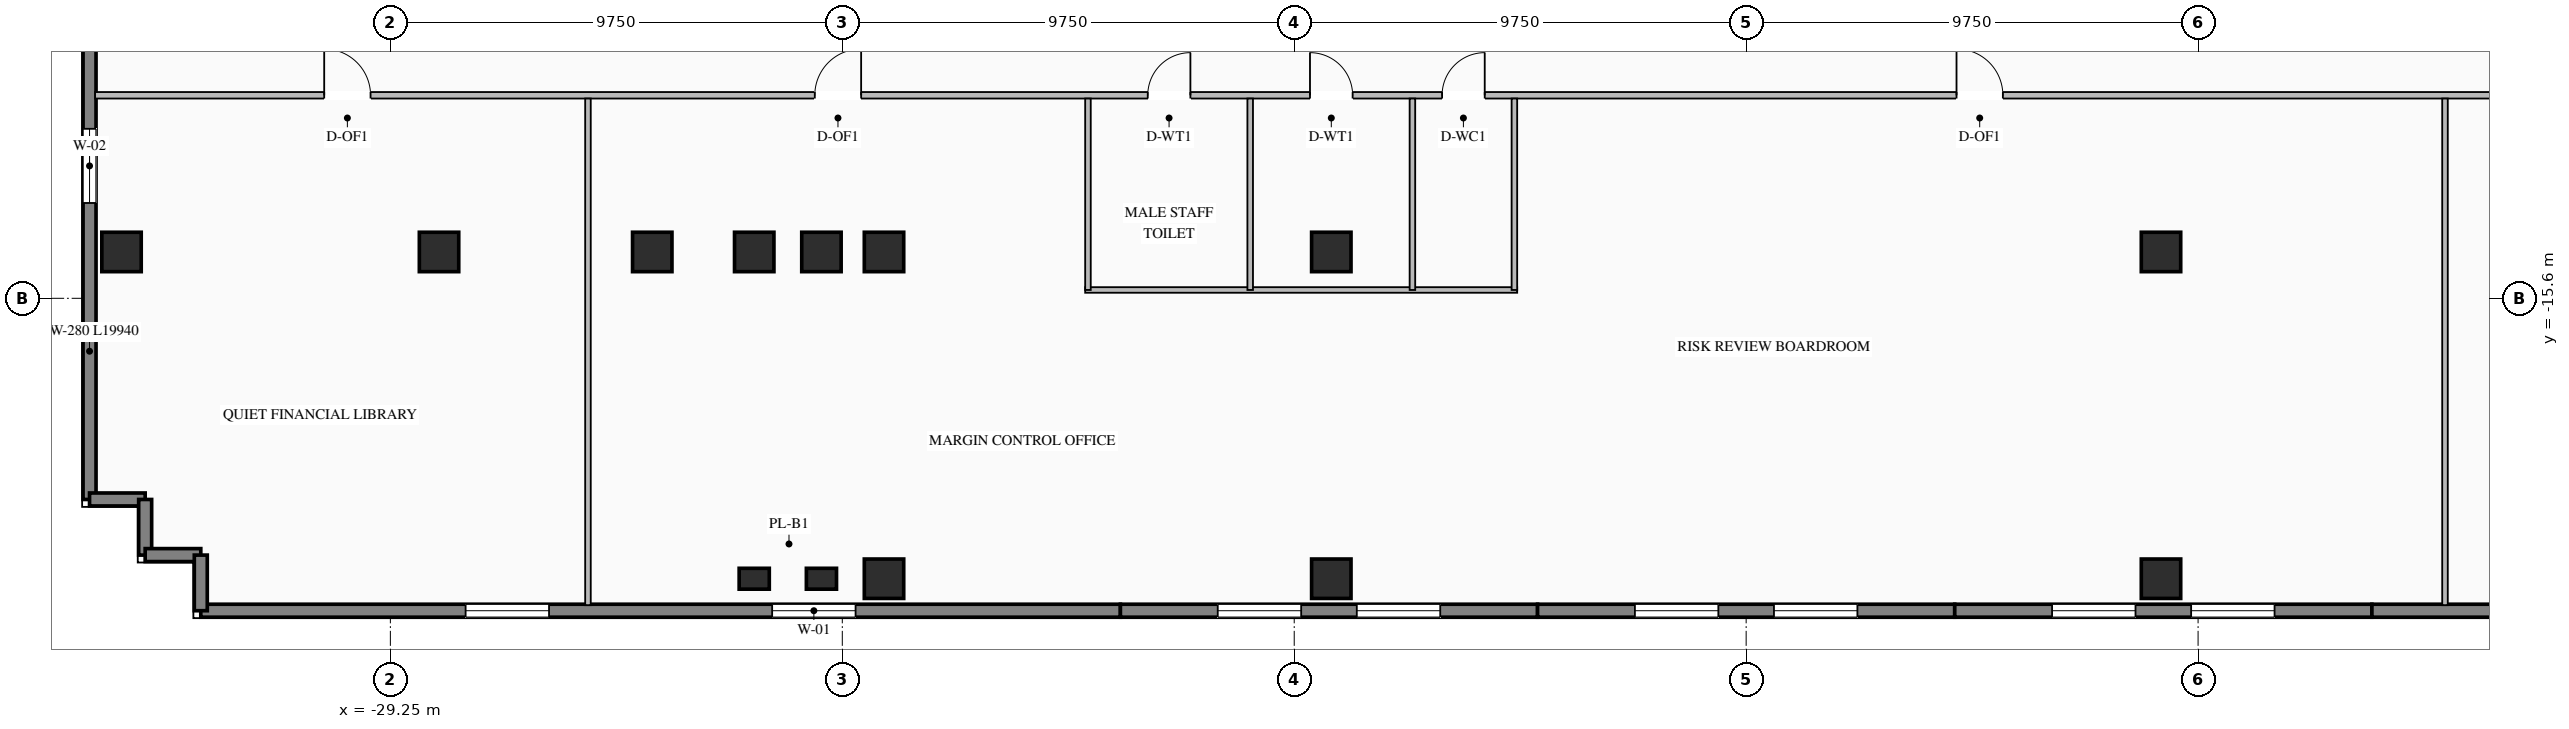
"""IFC4 building model, lengths in metres.
Left out: names, types, materials, properties, quantities, classifications, styles, units other than length and angle.
Written with IfcOpenShell. Run it as: python <this file> out.ifc"""

import sys

from ifc_helpers import new_model, si_unit, direction, frame, frame_2d, origin, origin_2d, place, context, subcontext, project, spatial, rectangle, i_section, extrude, element, fill, save


model = new_model("IFC4")
c1 = context("Model", 3, precision=1e-05, world=origin(), true_north=direction((0.0, 1.0)))
c2 = subcontext(c1, "Body", "Model", "MODEL_VIEW")
j1 = project(units=[si_unit("LENGTHUNIT", "METRE"), si_unit("PLANEANGLEUNIT", "RADIAN")], contexts=[c1])
p1 = place(None, origin())
s1 = spatial("IfcSite", under=j1, at=p1, CompositionType="ELEMENT")
p2 = place(p1, origin())
s2 = spatial("IfcBuilding", under=s1, at=p2, CompositionType="ELEMENT")
p3 = place(p2, frame((0.0, 0.0, 31.2)))
s3 = spatial("IfcBuildingStorey", under=s2, at=p3, CompositionType="ELEMENT", Elevation=31.2)
for number, where, z_axis, x_axis in (
    (1, (-21.4, -14.6, 0.0), (0.0, 0.0, 1.0), (1.0, 0.0, 0.0)),
    (2, (-19.95, -14.6, 0.0), (0.0, 0.0, 1.0), (1.0, 0.0, 0.0)),
    (3, (-18.6, -14.6, 0.0), (0.0, 0.0, 1.0), (1.0, 0.0, 0.0)),
    (4, (-8.95, -14.6, 0.0), (0.0, 0.0, 1.0), (1.0, 0.0, 0.0)),
    (5, (8.95, -14.6, 0.0), (0.0, 0.0, 1.0), (1.0, 0.0, 0.0)),
    (6, (-23.6, -14.6, 0.0), (0.0, 0.0, 1.0), (1.0, 0.0, 0.0)),
    (7, (-28.2, -14.6, 0.0), (0.0, 0.0, 1.0), (1.0, 0.0, 0.0)),
    (8, (-18.6, -21.65, 0.0), (0.0, 0.0, 1.0), (1.0, 0.0, 0.0)),
    (9, (-8.95, -21.65, 0.0), (0.0, 0.0, 1.0), (1.0, 0.0, 0.0)),
    (10, (8.95, -21.65, 0.0), (0.0, 0.0, 1.0), (1.0, 0.0, 0.0)),
    (11, (-35.05, -14.6, 0.0), (0.0, 0.0, 1.0), (1.0, 0.0, 0.0)),
):
    element("IfcColumn", number, at=place(p3, frame(where, z_axis=z_axis, x_axis=x_axis)), inside=s3, PredefinedType="COLUMN", context=c2, shape_type="SweptSolid", body=[
        extrude(i_section(OverallWidth=0.85, OverallDepth=0.85, WebThickness=0.032, FlangeThickness=0.048, at=origin_2d()), origin(), (0.0, 0.0, 1.0), 3.45),
    ])
for number, where, z_axis, x_axis in (
    (12, (-21.4, -21.65, 0.0), (0.0, 0.0, 1.0), (1.0, 0.0, 0.0)),
    (13, (-19.95, -21.65, 0.0), (0.0, 0.0, 1.0), (1.0, 0.0, 0.0)),
):
    element("IfcColumn", number, at=place(p3, frame(where, z_axis=z_axis, x_axis=x_axis)), inside=s3, PredefinedType="PILASTER", context=c2, shape_type="SweptSolid", body=[
        extrude(rectangle(XDim=0.65, YDim=0.45, at=origin_2d()), origin(), (0.0, 0.0, 1.0), 3.45),
    ])
p4 = place(p3, frame((-13.5, -22.34, 0.0), z_axis=(0.0, 0.0, 1.0), x_axis=(-1.0, 0.0, 0.0)))
e14 = element("IfcWall", 14, at=p4, inside=s3, PredefinedType="STANDARD", context=c2, shape_type="SweptSolid", body=[
    extrude(rectangle(XDim=19.84, YDim=0.28, at=frame_2d((9.92, 0.0))), origin(), (0.0, 0.0, 1.0), 3.25),
])
p5 = place(p4, frame((5.713, 0.0, 0.76)))
e15 = element("IfcOpeningElement", 15, at=p5, cuts=e14, PredefinedType="OPENING", context=c2, shape_type="SweptSolid", body=[
    extrude(rectangle(XDim=1.8, YDim=1.95, at=frame_2d((0.9, 0.975))), frame((0.0, 0.15, 0.0), z_axis=(0.0, -1.0, 0.0), x_axis=(1.0, 0.0, 0.0)), (0.0, 0.0, 1.0), 0.3),
])
p6 = place(p4, frame((12.327, 0.0, 0.76)))
e16 = element("IfcOpeningElement", 16, at=p6, cuts=e14, PredefinedType="OPENING", context=c2, shape_type="SweptSolid", body=[
    extrude(rectangle(XDim=1.8, YDim=1.95, at=frame_2d((0.9, 0.975))), frame((0.0, 0.15, 0.0), z_axis=(0.0, -1.0, 0.0), x_axis=(1.0, 0.0, 0.0)), (0.0, 0.0, 1.0), 0.3),
])
p7 = place(p3, frame((-4.5, -22.34, 0.0), z_axis=(0.0, 0.0, 1.0), x_axis=(-1.0, 0.0, 0.0)))
e17 = element("IfcWall", 17, at=p7, inside=s3, PredefinedType="STANDARD", context=c2, shape_type="SweptSolid", body=[
    extrude(rectangle(XDim=9.0, YDim=0.28, at=frame_2d((4.5, 0.0))), origin(), (0.0, 0.0, 1.0), 3.25),
])
p8 = place(p7, frame((2.1, 0.0, 0.76)))
e18 = element("IfcOpeningElement", 18, at=p8, cuts=e17, PredefinedType="OPENING", context=c2, shape_type="SweptSolid", body=[
    extrude(rectangle(XDim=1.8, YDim=1.95, at=frame_2d((0.9, 0.975))), frame((0.0, 0.15, 0.0), z_axis=(0.0, -1.0, 0.0), x_axis=(1.0, 0.0, 0.0)), (0.0, 0.0, 1.0), 0.3),
])
p9 = place(p7, frame((5.1, 0.0, 0.76)))
e19 = element("IfcOpeningElement", 19, at=p9, cuts=e17, PredefinedType="OPENING", context=c2, shape_type="SweptSolid", body=[
    extrude(rectangle(XDim=1.8, YDim=1.95, at=frame_2d((0.9, 0.975))), frame((0.0, 0.15, 0.0), z_axis=(0.0, -1.0, 0.0), x_axis=(1.0, 0.0, 0.0)), (0.0, 0.0, 1.0), 0.3),
])
p10 = place(p3, frame((4.5, -22.34, 0.0), z_axis=(0.0, 0.0, 1.0), x_axis=(-1.0, 0.0, 0.0)))
e20 = element("IfcWall", 20, at=p10, inside=s3, PredefinedType="STANDARD", context=c2, shape_type="SweptSolid", body=[
    extrude(rectangle(XDim=9.0, YDim=0.28, at=frame_2d((4.5, 0.0))), origin(), (0.0, 0.0, 1.0), 3.25),
])
p11 = place(p10, frame((2.1, 0.0, 0.76)))
e21 = element("IfcOpeningElement", 21, at=p11, cuts=e20, PredefinedType="OPENING", context=c2, shape_type="SweptSolid", body=[
    extrude(rectangle(XDim=1.8, YDim=1.95, at=frame_2d((0.9, 0.975))), frame((0.0, 0.15, 0.0), z_axis=(0.0, -1.0, 0.0), x_axis=(1.0, 0.0, 0.0)), (0.0, 0.0, 1.0), 0.3),
])
p12 = place(p10, frame((5.1, 0.0, 0.76)))
e22 = element("IfcOpeningElement", 22, at=p12, cuts=e20, PredefinedType="OPENING", context=c2, shape_type="SweptSolid", body=[
    extrude(rectangle(XDim=1.8, YDim=1.95, at=frame_2d((0.9, 0.975))), frame((0.0, 0.15, 0.0), z_axis=(0.0, -1.0, 0.0), x_axis=(1.0, 0.0, 0.0)), (0.0, 0.0, 1.0), 0.3),
])
p13 = place(p3, frame((13.5, -22.34, 0.0), z_axis=(0.0, 0.0, 1.0), x_axis=(-1.0, 0.0, 0.0)))
e23 = element("IfcWall", 23, at=p13, inside=s3, PredefinedType="STANDARD", context=c2, shape_type="SweptSolid", body=[
    extrude(rectangle(XDim=9.0, YDim=0.28, at=frame_2d((4.5, 0.0))), origin(), (0.0, 0.0, 1.0), 3.25),
])
p14 = place(p13, frame((2.1, 0.0, 0.76)))
e24 = element("IfcOpeningElement", 24, at=p14, cuts=e23, PredefinedType="OPENING", context=c2, shape_type="SweptSolid", body=[
    extrude(rectangle(XDim=1.8, YDim=1.95, at=frame_2d((0.9, 0.975))), frame((0.0, 0.15, 0.0), z_axis=(0.0, -1.0, 0.0), x_axis=(1.0, 0.0, 0.0)), (0.0, 0.0, 1.0), 0.3),
])
p15 = place(p13, frame((5.1, 0.0, 0.76)))
e25 = element("IfcOpeningElement", 25, at=p15, cuts=e23, PredefinedType="OPENING", context=c2, shape_type="SweptSolid", body=[
    extrude(rectangle(XDim=1.8, YDim=1.95, at=frame_2d((0.9, 0.975))), frame((0.0, 0.15, 0.0), z_axis=(0.0, -1.0, 0.0), x_axis=(1.0, 0.0, 0.0)), (0.0, 0.0, 1.0), 0.3),
])
p16 = place(p3, frame((33.34, -22.34, 0.0), z_axis=(0.0, 0.0, 1.0), x_axis=(-1.0, 0.0, 0.0)))
e26 = element("IfcWall", 26, at=p16, inside=s3, PredefinedType="STANDARD", context=c2, shape_type="SweptSolid", body=[
    extrude(rectangle(XDim=19.84, YDim=0.28, at=frame_2d((9.92, 0.0))), origin(), (0.0, 0.0, 1.0), 3.25),
])
p17 = place(p16, frame((5.713, 0.0, 0.76)))
e27 = element("IfcOpeningElement", 27, at=p17, cuts=e26, PredefinedType="OPENING", context=c2, shape_type="SweptSolid", body=[
    extrude(rectangle(XDim=1.8, YDim=1.95, at=frame_2d((0.9, 0.975))), frame((0.0, 0.15, 0.0), z_axis=(0.0, -1.0, 0.0), x_axis=(1.0, 0.0, 0.0)), (0.0, 0.0, 1.0), 0.3),
])
p18 = place(p16, frame((12.327, 0.0, 0.76)))
e28 = element("IfcOpeningElement", 28, at=p18, cuts=e26, PredefinedType="OPENING", context=c2, shape_type="SweptSolid", body=[
    extrude(rectangle(XDim=1.8, YDim=1.95, at=frame_2d((0.9, 0.975))), frame((0.0, 0.15, 0.0), z_axis=(0.0, -1.0, 0.0), x_axis=(1.0, 0.0, 0.0)), (0.0, 0.0, 1.0), 0.3),
])
p19 = place(p3, frame((-35.74, -19.94, 0.0), z_axis=(0.0, 0.0, 1.0), x_axis=(0.0, 1.0, 0.0)))
e29 = element("IfcWall", 29, at=p19, inside=s3, PredefinedType="STANDARD", context=c2, shape_type="SweptSolid", body=[
    extrude(rectangle(XDim=19.94, YDim=0.28, at=frame_2d((9.97, 0.0))), origin(), (0.0, 0.0, 1.0), 3.25),
])
p20 = place(p19, frame((6.397, 0.0, 0.76)))
e30 = element("IfcOpeningElement", 30, at=p20, cuts=e29, PredefinedType="OPENING", context=c2, shape_type="SweptSolid", body=[
    extrude(rectangle(XDim=1.6, YDim=1.95, at=frame_2d((0.8, 0.975))), frame((0.0, 0.15, 0.0), z_axis=(0.0, -1.0, 0.0), x_axis=(1.0, 0.0, 0.0)), (0.0, 0.0, 1.0), 0.3),
])
p21 = place(p19, frame((12.493, 0.0, 0.76)))
e31 = element("IfcOpeningElement", 31, at=p21, cuts=e29, PredefinedType="OPENING", context=c2, shape_type="SweptSolid", body=[
    extrude(rectangle(XDim=1.6, YDim=1.95, at=frame_2d((0.8, 0.975))), frame((0.0, 0.15, 0.0), z_axis=(0.0, -1.0, 0.0), x_axis=(1.0, 0.0, 0.0)), (0.0, 0.0, 1.0), 0.3),
])
for number, where, z_axis, x_axis in (
    (32, (-35.74, -19.94, 0.0), (0.0, 0.0, 1.0), (1.0, 0.0, 0.0)),
    (33, (-34.54, -19.94, 0.0), (0.0, 0.0, 1.0), (0.0, -1.0, 0.0)),
    (34, (-34.54, -21.14, 0.0), (0.0, 0.0, 1.0), (1.0, 0.0, 0.0)),
):
    element("IfcWall", number, at=place(p3, frame(where, z_axis=z_axis, x_axis=x_axis)), inside=s3, PredefinedType="STANDARD", context=c2, shape_type="SweptSolid", body=[
        extrude(rectangle(XDim=1.2, YDim=0.28, at=frame_2d((0.6, 0.0))), origin(), (0.0, 0.0, 1.0), 3.25),
    ])
p22 = place(p3, frame((-33.34, -21.14, 0.0), z_axis=(0.0, 0.0, 1.0), x_axis=(0.0, -1.0, 0.0)))
e35 = element("IfcWall", 35, at=p22, inside=s3, PredefinedType="STANDARD", context=c2, shape_type="SweptSolid", body=[
    extrude(rectangle(XDim=1.2, YDim=0.28, at=frame_2d((0.6, 0.0))), origin(), (0.0, 0.0, 1.0), 3.25),
])
p23 = place(p3, frame((-35.62, -11.22, 0.0), z_axis=(0.0, 0.0, 1.0), x_axis=(1.0, 0.0, 0.0)))
e36 = element("IfcWall", 36, at=p23, inside=s3, PredefinedType="STANDARD", context=c2, shape_type="SweptSolid", body=[
    extrude(rectangle(XDim=71.24, YDim=0.14, at=frame_2d((35.62, 0.0))), origin(), (0.0, 0.0, 1.0), 2.745),
])
p24 = place(p23, frame((22.71, 0.0, 0.0)))
e37 = element("IfcOpeningElement", 37, at=p24, cuts=e36, PredefinedType="OPENING", context=c2, shape_type="SweptSolid", body=[
    extrude(rectangle(XDim=0.92, YDim=2.08, at=frame_2d((0.46, 1.04))), frame((0.0, 0.08, 0.0), z_axis=(0.0, -1.0, 0.0), x_axis=(1.0, 0.0, 0.0)), (0.0, 0.0, 1.0), 0.16),
])
p25 = place(p23, frame((26.21, 0.0, 0.0)))
e38 = element("IfcOpeningElement", 38, at=p25, cuts=e36, PredefinedType="OPENING", context=c2, shape_type="SweptSolid", body=[
    extrude(rectangle(XDim=0.92, YDim=2.08, at=frame_2d((0.46, 1.04))), frame((0.0, 0.08, 0.0), z_axis=(0.0, -1.0, 0.0), x_axis=(1.0, 0.0, 0.0)), (0.0, 0.0, 1.0), 0.16),
])
p26 = place(p23, frame((29.06, 0.0, 0.0)))
e39 = element("IfcOpeningElement", 39, at=p26, cuts=e36, PredefinedType="OPENING", context=c2, shape_type="SweptSolid", body=[
    extrude(rectangle(XDim=0.92, YDim=2.08, at=frame_2d((0.46, 1.04))), frame((0.0, 0.08, 0.0), z_axis=(0.0, -1.0, 0.0), x_axis=(1.0, 0.0, 0.0)), (0.0, 0.0, 1.0), 0.16),
])
p27 = place(p23, frame((4.942, 0.0, 0.0)))
e40 = element("IfcOpeningElement", 40, at=p27, cuts=e36, PredefinedType="OPENING", context=c2, shape_type="SweptSolid", body=[
    extrude(rectangle(XDim=1.0, YDim=2.08, at=frame_2d((0.5, 1.04))), frame((0.0, 0.08, 0.0), z_axis=(0.0, -1.0, 0.0), x_axis=(1.0, 0.0, 0.0)), (0.0, 0.0, 1.0), 0.16),
])
p28 = place(p23, frame((15.527, 0.0, 0.0)))
e41 = element("IfcOpeningElement", 41, at=p28, cuts=e36, PredefinedType="OPENING", context=c2, shape_type="SweptSolid", body=[
    extrude(rectangle(XDim=1.0, YDim=2.08, at=frame_2d((0.5, 1.04))), frame((0.0, 0.08, 0.0), z_axis=(0.0, -1.0, 0.0), x_axis=(1.0, 0.0, 0.0)), (0.0, 0.0, 1.0), 0.16),
])
p29 = place(p23, frame((40.158, 0.0, 0.0)))
e42 = element("IfcOpeningElement", 42, at=p29, cuts=e36, PredefinedType="OPENING", context=c2, shape_type="SweptSolid", body=[
    extrude(rectangle(XDim=1.0, YDim=2.08, at=frame_2d((0.5, 1.04))), frame((0.0, 0.08, 0.0), z_axis=(0.0, -1.0, 0.0), x_axis=(1.0, 0.0, 0.0)), (0.0, 0.0, 1.0), 0.16),
])
p30 = place(p23, frame((60.343, 0.0, 0.0)))
e43 = element("IfcOpeningElement", 43, at=p30, cuts=e36, PredefinedType="OPENING", context=c2, shape_type="SweptSolid", body=[
    extrude(rectangle(XDim=1.0, YDim=2.08, at=frame_2d((0.5, 1.04))), frame((0.0, 0.08, 0.0), z_axis=(0.0, -1.0, 0.0), x_axis=(1.0, 0.0, 0.0)), (0.0, 0.0, 1.0), 0.16),
])
p31 = place(p3, frame((-14.26, -15.42, 0.0), z_axis=(0.0, 0.0, 1.0), x_axis=(1.0, 0.0, 0.0)))
e44 = element("IfcWall", 44, at=p31, inside=s3, PredefinedType="STANDARD", context=c2, shape_type="SweptSolid", body=[
    extrude(rectangle(XDim=9.32, YDim=0.12, at=frame_2d((4.66, 0.0))), origin(), (0.0, 0.0, 1.0), 3.25),
])
for number, where, z_axis, x_axis in (
    (45, (-14.2, -15.42, 0.0), (0.0, 0.0, 1.0), (0.0, 1.0, 0.0)),
    (46, (-10.7, -15.42, 0.0), (0.0, 0.0, 1.0), (0.0, 1.0, 0.0)),
    (47, (-7.2, -15.42, 0.0), (0.0, 0.0, 1.0), (0.0, 1.0, 0.0)),
    (48, (-5.0, -15.42, 0.0), (0.0, 0.0, 1.0), (0.0, 1.0, 0.0)),
):
    element("IfcWall", number, at=place(p3, frame(where, z_axis=z_axis, x_axis=x_axis)), inside=s3, PredefinedType="STANDARD", context=c2, shape_type="SweptSolid", body=[
        extrude(rectangle(XDim=4.13, YDim=0.12, at=frame_2d((2.065, 0.0))), origin(), (0.0, 0.0, 1.0), 3.25),
    ])
for number, where, z_axis, x_axis in (
    (49, (-24.987, -22.22, 0.0), (0.0, 0.0, 1.0), (0.0, 1.0, 0.0)),
    (50, (15.077, -22.22, 0.0), (0.0, 0.0, 1.0), (0.0, 1.0, 0.0)),
):
    element("IfcWall", number, at=place(p3, frame(where, z_axis=z_axis, x_axis=x_axis)), inside=s3, PredefinedType="STANDARD", context=c2, shape_type="SweptSolid", body=[
        extrude(rectangle(XDim=10.93, YDim=0.12, at=frame_2d((5.465, 0.0))), origin(), (0.0, 0.0, 1.0), 3.25),
    ])
p32 = place(p5, origin())
e51 = element("IfcWindow", 51, at=p32, inside=s3, PartitioningType="SINGLE_PANEL", PredefinedType="WINDOW", context=c2, shape_type="SweptSolid", body=[
    extrude(rectangle(XDim=1.8, YDim=1.95, at=frame_2d((0.9, 0.975))), frame((0.0, 0.03, 0.0), z_axis=(0.0, -1.0, 0.0), x_axis=(1.0, 0.0, 0.0)), (0.0, 0.0, 1.0), 0.06),
])
fill(e15, e51)
p33 = place(p6, origin())
e52 = element("IfcWindow", 52, at=p33, inside=s3, PartitioningType="SINGLE_PANEL", PredefinedType="WINDOW", context=c2, shape_type="SweptSolid", body=[
    extrude(rectangle(XDim=1.8, YDim=1.95, at=frame_2d((0.9, 0.975))), frame((0.0, 0.03, 0.0), z_axis=(0.0, -1.0, 0.0), x_axis=(1.0, 0.0, 0.0)), (0.0, 0.0, 1.0), 0.06),
])
fill(e16, e52)
p34 = place(p8, origin())
e53 = element("IfcWindow", 53, at=p34, inside=s3, PartitioningType="SINGLE_PANEL", PredefinedType="WINDOW", context=c2, shape_type="SweptSolid", body=[
    extrude(rectangle(XDim=1.8, YDim=1.95, at=frame_2d((0.9, 0.975))), frame((0.0, 0.03, 0.0), z_axis=(0.0, -1.0, 0.0), x_axis=(1.0, 0.0, 0.0)), (0.0, 0.0, 1.0), 0.06),
])
fill(e18, e53)
p35 = place(p9, origin())
e54 = element("IfcWindow", 54, at=p35, inside=s3, PartitioningType="SINGLE_PANEL", PredefinedType="WINDOW", context=c2, shape_type="SweptSolid", body=[
    extrude(rectangle(XDim=1.8, YDim=1.95, at=frame_2d((0.9, 0.975))), frame((0.0, 0.03, 0.0), z_axis=(0.0, -1.0, 0.0), x_axis=(1.0, 0.0, 0.0)), (0.0, 0.0, 1.0), 0.06),
])
fill(e19, e54)
p36 = place(p11, origin())
e55 = element("IfcWindow", 55, at=p36, inside=s3, PartitioningType="SINGLE_PANEL", PredefinedType="WINDOW", context=c2, shape_type="SweptSolid", body=[
    extrude(rectangle(XDim=1.8, YDim=1.95, at=frame_2d((0.9, 0.975))), frame((0.0, 0.03, 0.0), z_axis=(0.0, -1.0, 0.0), x_axis=(1.0, 0.0, 0.0)), (0.0, 0.0, 1.0), 0.06),
])
fill(e21, e55)
p37 = place(p12, origin())
e56 = element("IfcWindow", 56, at=p37, inside=s3, PartitioningType="SINGLE_PANEL", PredefinedType="WINDOW", context=c2, shape_type="SweptSolid", body=[
    extrude(rectangle(XDim=1.8, YDim=1.95, at=frame_2d((0.9, 0.975))), frame((0.0, 0.03, 0.0), z_axis=(0.0, -1.0, 0.0), x_axis=(1.0, 0.0, 0.0)), (0.0, 0.0, 1.0), 0.06),
])
fill(e22, e56)
p38 = place(p14, origin())
e57 = element("IfcWindow", 57, at=p38, inside=s3, PartitioningType="SINGLE_PANEL", PredefinedType="WINDOW", context=c2, shape_type="SweptSolid", body=[
    extrude(rectangle(XDim=1.8, YDim=1.95, at=frame_2d((0.9, 0.975))), frame((0.0, 0.03, 0.0), z_axis=(0.0, -1.0, 0.0), x_axis=(1.0, 0.0, 0.0)), (0.0, 0.0, 1.0), 0.06),
])
fill(e24, e57)
p39 = place(p15, origin())
e58 = element("IfcWindow", 58, at=p39, inside=s3, PartitioningType="SINGLE_PANEL", PredefinedType="WINDOW", context=c2, shape_type="SweptSolid", body=[
    extrude(rectangle(XDim=1.8, YDim=1.95, at=frame_2d((0.9, 0.975))), frame((0.0, 0.03, 0.0), z_axis=(0.0, -1.0, 0.0), x_axis=(1.0, 0.0, 0.0)), (0.0, 0.0, 1.0), 0.06),
])
fill(e25, e58)
p40 = place(p20, origin())
e59 = element("IfcWindow", 59, at=p40, inside=s3, PartitioningType="SINGLE_PANEL", PredefinedType="WINDOW", context=c2, shape_type="SweptSolid", body=[
    extrude(rectangle(XDim=1.6, YDim=1.95, at=frame_2d((0.8, 0.975))), frame((0.0, 0.03, 0.0), z_axis=(0.0, -1.0, 0.0), x_axis=(1.0, 0.0, 0.0)), (0.0, 0.0, 1.0), 0.06),
])
fill(e30, e59)
p41 = place(p24, origin())
e60 = element("IfcDoor", 60, at=p41, inside=s3, OperationType="SINGLE_SWING_RIGHT", PredefinedType="DOOR", context=c2, shape_type="SweptSolid", body=[
    extrude(rectangle(XDim=0.92, YDim=2.08, at=frame_2d((0.46, 1.04))), frame((0.0, 0.025, 0.0), z_axis=(0.0, -1.0, 0.0), x_axis=(1.0, 0.0, 0.0)), (0.0, 0.0, 1.0), 0.05),
])
fill(e37, e60)
p42 = place(p25, origin())
e61 = element("IfcDoor", 61, at=p42, inside=s3, OperationType="SINGLE_SWING_LEFT", PredefinedType="DOOR", context=c2, shape_type="SweptSolid", body=[
    extrude(rectangle(XDim=0.92, YDim=2.08, at=frame_2d((0.46, 1.04))), frame((0.0, 0.025, 0.0), z_axis=(0.0, -1.0, 0.0), x_axis=(1.0, 0.0, 0.0)), (0.0, 0.0, 1.0), 0.05),
])
fill(e38, e61)
p43 = place(p26, origin())
e62 = element("IfcDoor", 62, at=p43, inside=s3, OperationType="SINGLE_SWING_RIGHT", PredefinedType="DOOR", context=c2, shape_type="SweptSolid", body=[
    extrude(rectangle(XDim=0.92, YDim=2.08, at=frame_2d((0.46, 1.04))), frame((0.0, 0.025, 0.0), z_axis=(0.0, -1.0, 0.0), x_axis=(1.0, 0.0, 0.0)), (0.0, 0.0, 1.0), 0.05),
])
fill(e39, e62)
p44 = place(p27, origin())
e63 = element("IfcDoor", 63, at=p44, inside=s3, OperationType="SINGLE_SWING_LEFT", PredefinedType="DOOR", context=c2, shape_type="SweptSolid", body=[
    extrude(rectangle(XDim=1.0, YDim=2.08, at=frame_2d((0.5, 1.04))), frame((0.0, 0.025, 0.0), z_axis=(0.0, -1.0, 0.0), x_axis=(1.0, 0.0, 0.0)), (0.0, 0.0, 1.0), 0.05),
])
fill(e40, e63)
p45 = place(p28, origin())
e64 = element("IfcDoor", 64, at=p45, inside=s3, OperationType="SINGLE_SWING_RIGHT", PredefinedType="DOOR", context=c2, shape_type="SweptSolid", body=[
    extrude(rectangle(XDim=1.0, YDim=2.08, at=frame_2d((0.5, 1.04))), frame((0.0, 0.025, 0.0), z_axis=(0.0, -1.0, 0.0), x_axis=(1.0, 0.0, 0.0)), (0.0, 0.0, 1.0), 0.05),
])
fill(e41, e64)
p46 = place(p29, origin())
e65 = element("IfcDoor", 65, at=p46, inside=s3, OperationType="SINGLE_SWING_LEFT", PredefinedType="DOOR", context=c2, shape_type="SweptSolid", body=[
    extrude(rectangle(XDim=1.0, YDim=2.08, at=frame_2d((0.5, 1.04))), frame((0.0, 0.025, 0.0), z_axis=(0.0, -1.0, 0.0), x_axis=(1.0, 0.0, 0.0)), (0.0, 0.0, 1.0), 0.05),
])
fill(e42, e65)
save(model, sys.argv[1])
